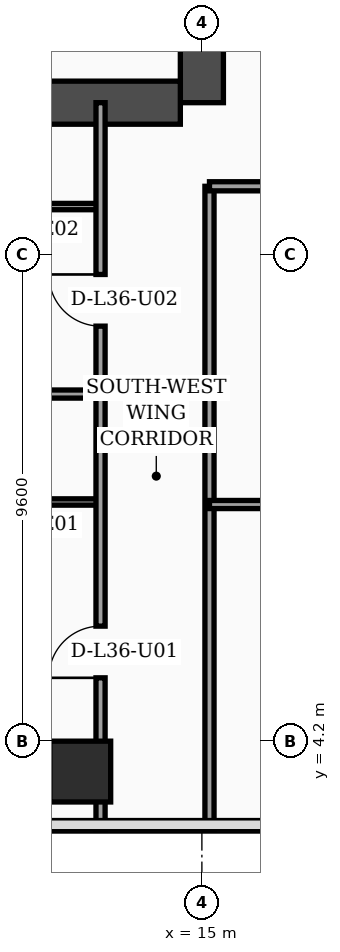
"""IFC4 building model, lengths in metres.
Left out: names, types, materials, properties, quantities, classifications, styles, units other than length and angle.
Written with IfcOpenShell. Run it as: python <this file> out.ifc"""

import sys

from ifc_helpers import new_model, si_unit, direction, frame, frame_2d, origin, origin_2d, place, context, subcontext, project, spatial, rectangle, extrude, element, fill, save


model = new_model("IFC4")
c1 = context("Model", 3, precision=1e-05, world=origin(), true_north=direction((0.0, 1.0)))
c2 = subcontext(c1, "Body", "Model", "MODEL_VIEW")
j1 = project(units=[si_unit("LENGTHUNIT", "METRE"), si_unit("PLANEANGLEUNIT", "RADIAN")], contexts=[c1])
p1 = place(None, origin())
s1 = spatial("IfcSite", under=j1, at=p1, CompositionType="ELEMENT")
p2 = place(p1, origin())
s2 = spatial("IfcBuilding", under=s1, at=p2, CompositionType="ELEMENT")
p3 = place(p2, frame((0.0, 0.0, 148.5)))
s3 = spatial("IfcBuildingStorey", under=s2, at=p3, CompositionType="ELEMENT", Elevation=148.5)
p4 = place(p3, frame((15.0, 16.8, 0.0), z_axis=(0.0, 0.0, 1.0), x_axis=(0.0, 1.0, 0.0)))
e1 = element("IfcWall", 1, at=p4, inside=s3, PredefinedType="SHEAR", context=c2, shape_type="SweptSolid", body=[
    extrude(rectangle(XDim=21.6, YDim=0.85, at=frame_2d((10.8, 0.0))), origin(), (0.0, 0.0, 1.0), 3.56),
])
p5 = place(p4, frame((8.65, 0.0, 0.0)))
e2 = element("IfcOpeningElement", 2, at=p5, cuts=e1, PredefinedType="OPENING", context=c2, shape_type="SweptSolid", body=[
    extrude(rectangle(XDim=1.1, YDim=2.2, at=frame_2d((0.55, 1.1))), frame((0.0, 0.435, 0.0), z_axis=(0.0, -1.0, 0.0), x_axis=(1.0, 0.0, 0.0)), (0.0, 0.0, 1.0), 0.87),
])
p6 = place(p4, frame((10.85, 0.0, 0.0)))
e3 = element("IfcOpeningElement", 3, at=p6, cuts=e1, PredefinedType="OPENING", context=c2, shape_type="SweptSolid", body=[
    extrude(rectangle(XDim=1.1, YDim=2.2, at=frame_2d((0.55, 1.1))), frame((0.0, 0.435, 0.0), z_axis=(0.0, -1.0, 0.0), x_axis=(1.0, 0.0, 0.0)), (0.0, 0.0, 1.0), 0.87),
])
p7 = place(p4, frame((13.5, 0.0, 0.0)))
e4 = element("IfcOpeningElement", 4, at=p7, cuts=e1, PredefinedType="OPENING", context=c2, shape_type="SweptSolid", body=[
    extrude(rectangle(XDim=1.1, YDim=2.2, at=frame_2d((0.55, 1.1))), frame((0.0, 0.435, 0.0), z_axis=(0.0, -1.0, 0.0), x_axis=(1.0, 0.0, 0.0)), (0.0, 0.0, 1.0), 0.87),
])
p8 = place(p4, frame((16.15, 0.0, 0.0)))
e5 = element("IfcOpeningElement", 5, at=p8, cuts=e1, PredefinedType="OPENING", context=c2, shape_type="SweptSolid", body=[
    extrude(rectangle(XDim=1.1, YDim=2.2, at=frame_2d((0.55, 1.1))), frame((0.0, 0.435, 0.0), z_axis=(0.0, -1.0, 0.0), x_axis=(1.0, 0.0, 0.0)), (0.0, 0.0, 1.0), 0.87),
])
p9 = place(p3, frame((4.625, 16.8, 0.0), z_axis=(0.0, 0.0, 1.0), x_axis=(1.0, 0.0, 0.0)))
e6 = element("IfcWall", 6, at=p9, inside=s3, PredefinedType="SHEAR", context=c2, shape_type="SweptSolid", body=[
    extrude(rectangle(XDim=9.95, YDim=0.85, at=frame_2d((4.975, 0.0))), origin(), (0.0, 0.0, 1.0), 3.56),
])
p10 = place(p3, frame((12.6, 3.6, 0.0), z_axis=(0.0, 0.0, 1.0), x_axis=(1.0, 0.0, 0.0)))
e7 = element("IfcColumn", 7, at=p10, inside=s3, PredefinedType="COLUMN", context=c2, shape_type="SweptSolid", body=[
    extrude(rectangle(XDim=1.2, YDim=1.2, at=origin_2d()), origin(), (0.0, 0.0, 1.0), 3.56),
])
p11 = place(p3, frame((3.2, 8.92, 0.0), z_axis=(0.0, 0.0, 1.0), x_axis=(1.0, 0.0, 0.0)))
e8 = element("IfcWall", 8, at=p11, inside=s3, PredefinedType="PARTITIONING", context=c2, shape_type="SweptSolid", body=[
    extrude(rectangle(XDim=9.8, YDim=0.125, at=frame_2d((4.9, 0.0))), origin(), (0.0, 0.0, 1.0), 2.94),
])
p12 = place(p11, frame((3.32, 0.0, 0.0)))
e9 = element("IfcOpeningElement", 9, at=p12, cuts=e8, PredefinedType="OPENING", context=c2, shape_type="SweptSolid", body=[
    extrude(rectangle(XDim=0.96, YDim=2.2, at=frame_2d((0.48, 1.1))), frame((0.0, 0.073, 0.0), z_axis=(0.0, -1.0, 0.0), x_axis=(1.0, 0.0, 0.0)), (0.0, 0.0, 1.0), 0.145),
])
p13 = place(p11, frame((7.89, 0.0, 0.0)))
e10 = element("IfcOpeningElement", 10, at=p13, cuts=e8, PredefinedType="OPENING", context=c2, shape_type="SweptSolid", body=[
    extrude(rectangle(XDim=0.9, YDim=2.15, at=frame_2d((0.45, 1.075))), frame((0.0, 0.073, 0.0), z_axis=(0.0, -1.0, 0.0), x_axis=(1.0, 0.0, 0.0)), (0.0, 0.0, 1.0), 0.145),
])
p14 = place(p3, frame((0.08, 14.75, 0.0), z_axis=(0.0, 0.0, 1.0), x_axis=(1.0, 0.0, 0.0)))
e11 = element("IfcWall", 11, at=p14, inside=s3, PredefinedType="PARTITIONING", context=c2, shape_type="SweptSolid", body=[
    extrude(rectangle(XDim=12.92, YDim=0.125, at=frame_2d((6.46, 0.0))), origin(), (0.0, 0.0, 1.0), 2.94),
])
p15 = place(p14, frame((4.52, 0.0, 0.0)))
e12 = element("IfcOpeningElement", 12, at=p15, cuts=e11, PredefinedType="OPENING", context=c2, shape_type="SweptSolid", body=[
    extrude(rectangle(XDim=0.96, YDim=2.2, at=frame_2d((0.48, 1.1))), frame((0.0, 0.073, 0.0), z_axis=(0.0, -1.0, 0.0), x_axis=(1.0, 0.0, 0.0)), (0.0, 0.0, 1.0), 0.145),
])
p16 = place(p14, frame((11.01, 0.0, 0.0)))
e13 = element("IfcOpeningElement", 13, at=p16, cuts=e11, PredefinedType="OPENING", context=c2, shape_type="SweptSolid", body=[
    extrude(rectangle(XDim=0.9, YDim=2.15, at=frame_2d((0.45, 1.075))), frame((0.0, 0.073, 0.0), z_axis=(0.0, -1.0, 0.0), x_axis=(1.0, 0.0, 0.0)), (0.0, 0.0, 1.0), 0.145),
])
p17 = place(p3, frame((0.08, 11.05, 0.0), z_axis=(0.0, 0.0, 1.0), x_axis=(1.0, 0.0, 0.0)))
e14 = element("IfcWall", 14, at=p17, inside=s3, PredefinedType="PARTITIONING", context=c2, shape_type="SweptSolid", body=[
    extrude(rectangle(XDim=12.92, YDim=0.16, at=frame_2d((6.46, 0.0))), origin(), (0.0, 0.0, 1.0), 2.94),
])
p18 = place(p3, frame((13.0, 2.44, 0.0), z_axis=(0.0, 0.0, 1.0), x_axis=(0.0, 1.0, 0.0)))
e15 = element("IfcWall", 15, at=p18, inside=s3, PredefinedType="PARTITIONING", context=c2, shape_type="SweptSolid", body=[
    extrude(rectangle(XDim=14.36, YDim=0.18, at=frame_2d((7.18, 0.0))), origin(), (0.0, 0.0, 1.0), 2.94),
])
p19 = place(p18, frame((3.01, 0.0, 0.0)))
e16 = element("IfcOpeningElement", 16, at=p19, cuts=e15, PredefinedType="OPENING", context=c2, shape_type="SweptSolid", body=[
    extrude(rectangle(XDim=1.02, YDim=2.2, at=frame_2d((0.51, 1.1))), frame((0.0, 0.1, 0.0), z_axis=(0.0, -1.0, 0.0), x_axis=(1.0, 0.0, 0.0)), (0.0, 0.0, 1.0), 0.2),
])
p20 = place(p18, frame((9.95, 0.0, 0.0)))
e17 = element("IfcOpeningElement", 17, at=p20, cuts=e15, PredefinedType="OPENING", context=c2, shape_type="SweptSolid", body=[
    extrude(rectangle(XDim=1.02, YDim=2.2, at=frame_2d((0.51, 1.1))), frame((0.0, 0.1, 0.0), z_axis=(0.0, -1.0, 0.0), x_axis=(1.0, 0.0, 0.0)), (0.0, 0.0, 1.0), 0.2),
])
p21 = place(p3, frame((15.15, 2.44, 0.0), z_axis=(0.0, 0.0, 1.0), x_axis=(0.0, 1.0, 0.0)))
e18 = element("IfcWall", 18, at=p21, inside=s3, PredefinedType="PARTITIONING", context=c2, shape_type="SweptSolid", body=[
    extrude(rectangle(XDim=12.71, YDim=0.18, at=frame_2d((6.355, 0.0))), origin(), (0.0, 0.0, 1.0), 3.04),
])
p22 = place(p3, frame((15.15, 8.87, 0.0), z_axis=(0.0, 0.0, 1.0), x_axis=(1.0, 0.0, 0.0)))
e19 = element("IfcWall", 19, at=p22, inside=s3, PredefinedType="PARTITIONING", context=c2, shape_type="SweptSolid", body=[
    extrude(rectangle(XDim=4.45, YDim=0.16, at=frame_2d((2.225, 0.0))), origin(), (0.0, 0.0, 1.0), 3.56),
])
p23 = place(p22, frame((1.75, 0.0, 0.0)))
e20 = element("IfcOpeningElement", 20, at=p23, cuts=e19, PredefinedType="OPENING", context=c2, shape_type="SweptSolid", body=[
    extrude(rectangle(XDim=0.96, YDim=2.2, at=frame_2d((0.48, 1.1))), frame((0.0, 0.09, 0.0), z_axis=(0.0, -1.0, 0.0), x_axis=(1.0, 0.0, 0.0)), (0.0, 0.0, 1.0), 0.18),
])
p24 = place(p3, frame((15.15, 15.15, 0.0), z_axis=(0.0, 0.0, 1.0), x_axis=(1.0, 0.0, 0.0)))
e21 = element("IfcWall", 21, at=p24, inside=s3, PredefinedType="PARTITIONING", context=c2, shape_type="SweptSolid", body=[
    extrude(rectangle(XDim=6.45, YDim=0.18, at=frame_2d((3.225, 0.0))), origin(), (0.0, 0.0, 1.0), 2.49),
])
p25 = place(p24, frame((1.74, 0.0, 0.0)))
e22 = element("IfcOpeningElement", 22, at=p25, cuts=e21, PredefinedType="OPENING", context=c2, shape_type="SweptSolid", body=[
    extrude(rectangle(XDim=1.02, YDim=2.2, at=frame_2d((0.51, 1.1))), frame((0.0, 0.1, 0.0), z_axis=(0.0, -1.0, 0.0), x_axis=(1.0, 0.0, 0.0)), (0.0, 0.0, 1.0), 0.2),
])
p26 = place(p19, origin())
e23 = element("IfcDoor", 23, at=p26, inside=s3, OperationType="SINGLE_SWING_LEFT", PredefinedType="DOOR", context=c2, shape_type="SweptSolid", body=[
    extrude(rectangle(XDim=1.02, YDim=2.2, at=frame_2d((0.51, 1.1))), frame((0.0, 0.025, 0.0), z_axis=(0.0, -1.0, 0.0), x_axis=(1.0, 0.0, 0.0)), (0.0, 0.0, 1.0), 0.05),
])
fill(e16, e23)
p27 = place(p20, origin())
e24 = element("IfcDoor", 24, at=p27, inside=s3, OperationType="SINGLE_SWING_RIGHT", PredefinedType="DOOR", context=c2, shape_type="SweptSolid", body=[
    extrude(rectangle(XDim=1.02, YDim=2.2, at=frame_2d((0.51, 1.1))), frame((0.0, 0.025, 0.0), z_axis=(0.0, -1.0, 0.0), x_axis=(1.0, 0.0, 0.0)), (0.0, 0.0, 1.0), 0.05),
])
fill(e17, e24)
save(model, sys.argv[1])
